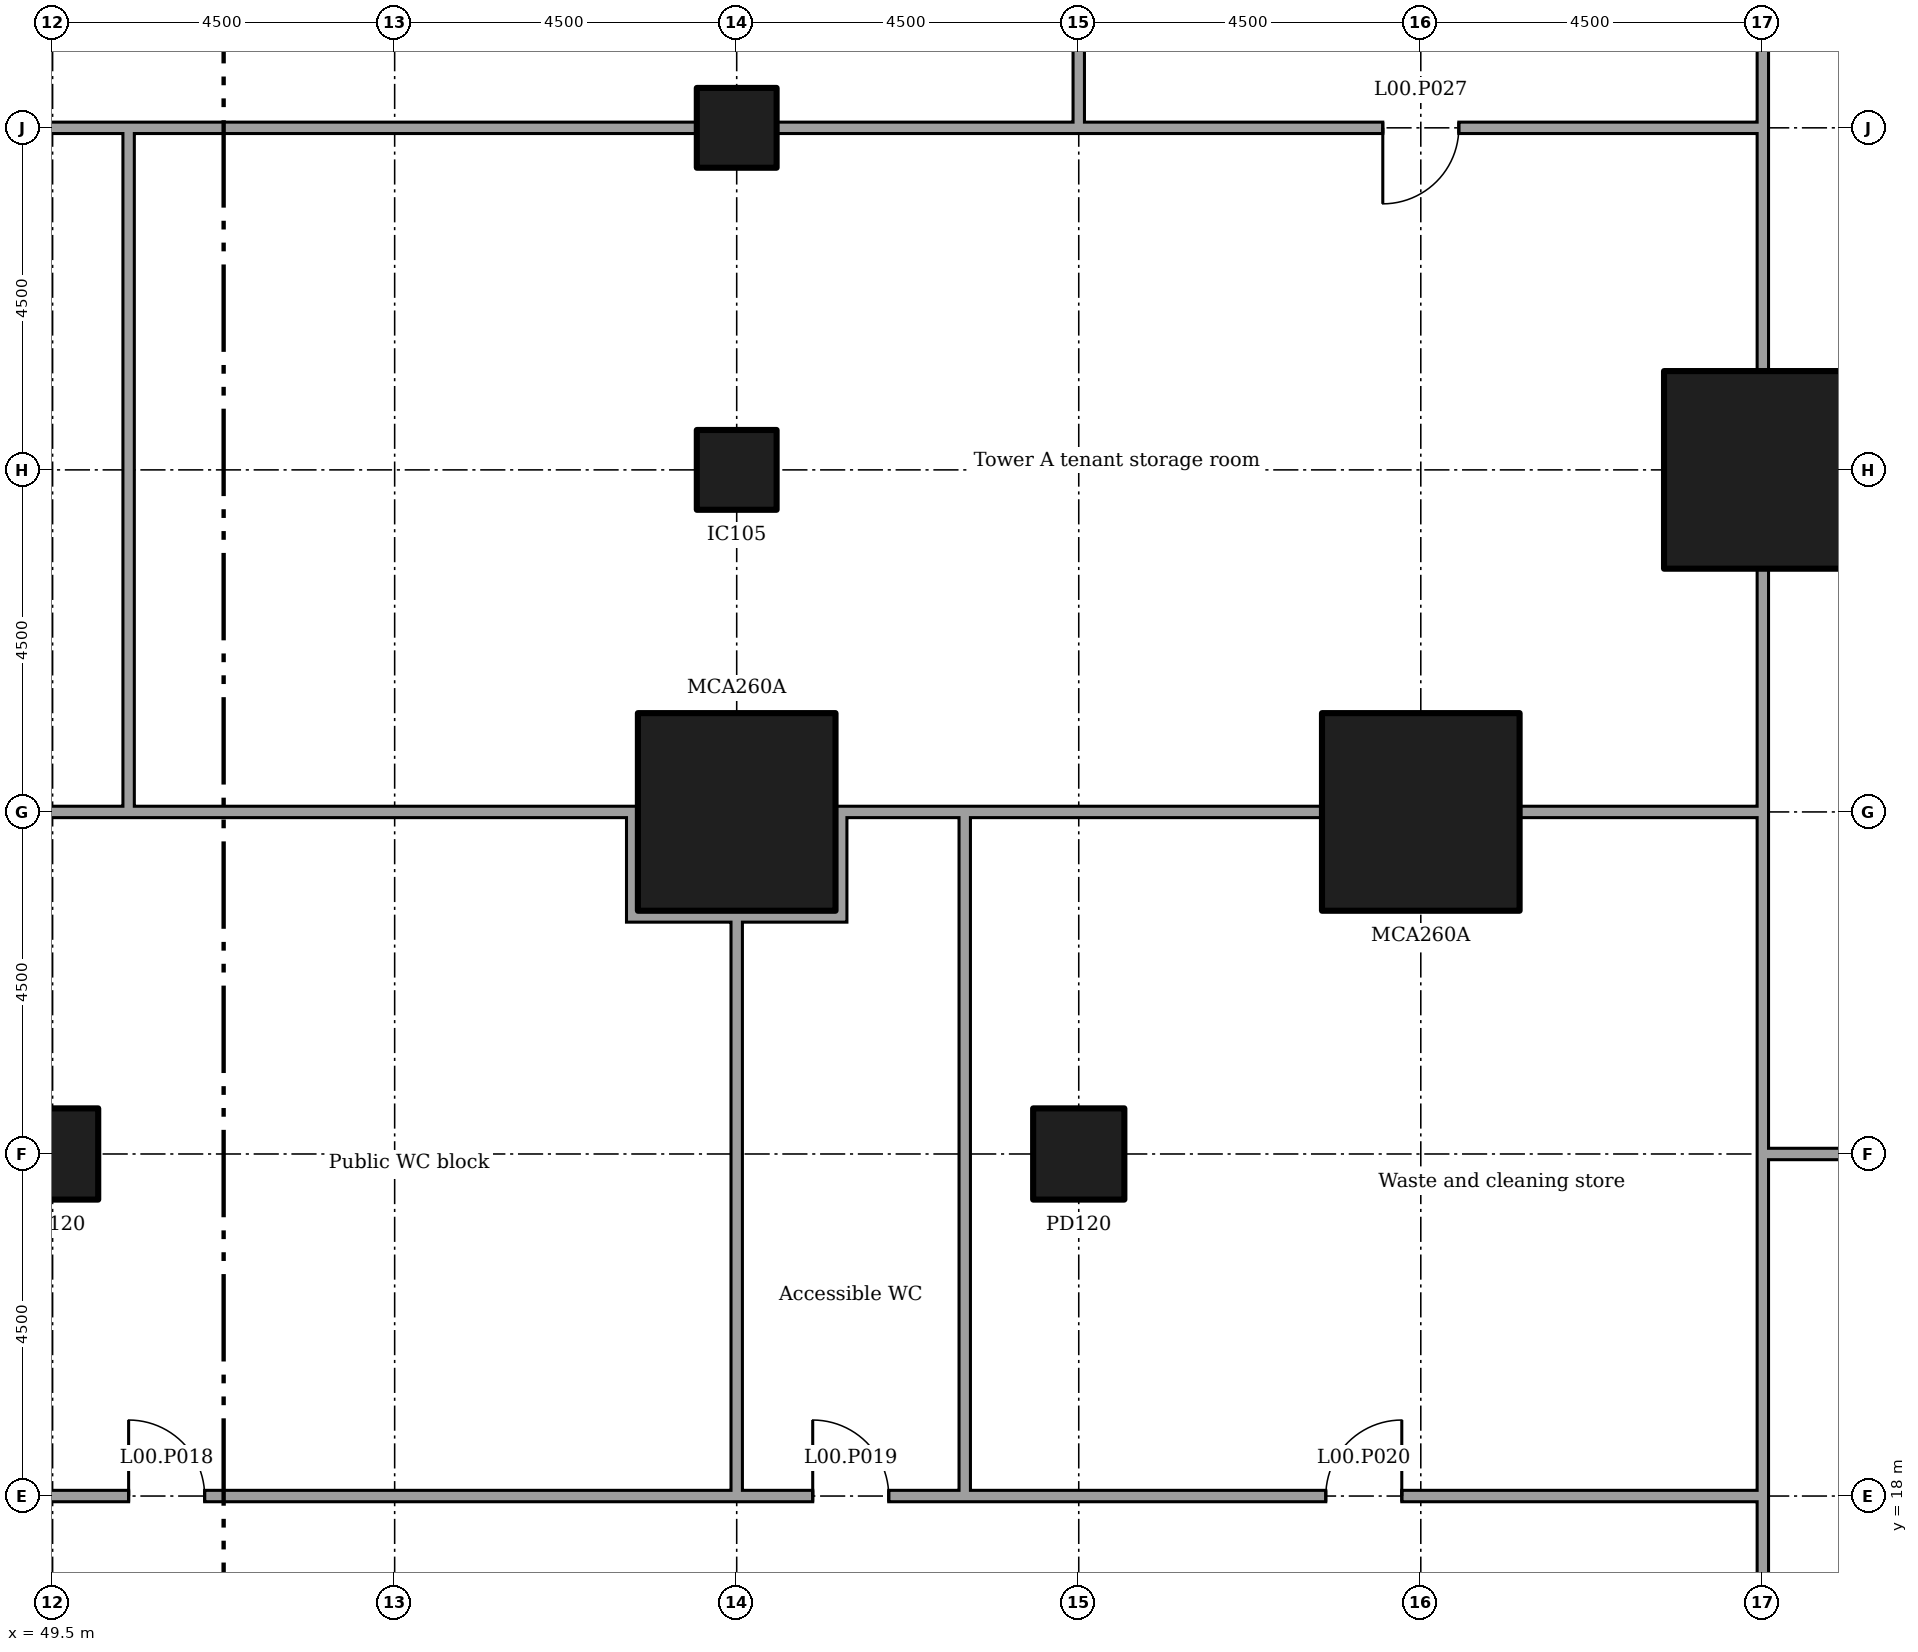
"""IFC4 building model, lengths in metres.
Left out: names, types, materials, properties, quantities, classifications, styles, units other than length and angle.
Written with IfcOpenShell. Run it as: python <this file> out.ifc"""

import sys

from ifc_helpers import new_model, si_unit, direction, frame, frame_2d, origin, origin_2d, place, context, subcontext, project, spatial, rectangle, extrude, element, fill, save


model = new_model("IFC4")
c1 = context("Model", 3, precision=1e-05, world=origin(), true_north=direction((0.0, 1.0)))
c2 = subcontext(c1, "Body", "Model", "MODEL_VIEW")
j1 = project(units=[si_unit("LENGTHUNIT", "METRE"), si_unit("PLANEANGLEUNIT", "RADIAN")], contexts=[c1])
p1 = place(None, origin())
s1 = spatial("IfcSite", under=j1, at=p1, CompositionType="ELEMENT")
p2 = place(p1, origin())
s2 = spatial("IfcBuilding", under=s1, at=p2, CompositionType="ELEMENT")
p3 = place(p2, origin())
s3 = spatial("IfcBuildingStorey", under=s2, at=p3, CompositionType="ELEMENT", Elevation=0.0)
for number, where in (
    (1, (58.5, 27.0, 0.0)),
    (2, (67.5, 27.0, 0.0)),
    (3, (72.0, 31.5, 0.0)),
):
    element("IfcColumn", number, at=place(p3, frame(where)), inside=s3, PredefinedType="COLUMN", context=c2, shape_type="SweptSolid", body=[
        extrude(rectangle(XDim=2.6, YDim=2.6, at=origin_2d()), origin(), (0.0, 0.0, 1.0), 6.0),
    ])
for number, where in (
    (4, (58.5, 31.5, 0.0)),
    (5, (58.5, 36.0, 0.0)),
):
    element("IfcColumn", number, at=place(p3, frame(where)), inside=s3, PredefinedType="COLUMN", context=c2, shape_type="SweptSolid", body=[
        extrude(rectangle(XDim=1.05, YDim=1.05, at=origin_2d()), origin(), (0.0, 0.0, 1.0), 6.0),
    ])
for number, where in (
    (6, (49.5, 22.5, 0.0)),
    (7, (63.0, 22.5, 0.0)),
):
    element("IfcColumn", number, at=place(p3, frame(where)), inside=s3, PredefinedType="COLUMN", context=c2, shape_type="SweptSolid", body=[
        extrude(rectangle(XDim=1.2, YDim=1.2, at=origin_2d()), origin(), (0.0, 0.0, 1.0), 6.0),
    ])
p4 = place(p3, frame((71.925, 22.5, 0.0)))
e8 = element("IfcWall", 8, at=p4, inside=s3, PredefinedType="PARTITIONING", context=c2, shape_type="SweptSolid", body=[
    extrude(rectangle(XDim=3.98, YDim=0.15, at=frame_2d((1.99, 0.0))), origin(), (0.0, 0.0, 1.0), 5.55),
])
p5 = place(p4, frame((1.125, 0.0, 0.0)))
e9 = element("IfcOpeningElement", 9, at=p5, cuts=e8, PredefinedType="OPENING", context=c2, shape_type="SweptSolid", body=[
    extrude(rectangle(XDim=1.8, YDim=2.1, at=frame_2d((0.9, 1.05))), frame((0.0, 0.085, 0.0), z_axis=(0.0, -1.0, 0.0), x_axis=(1.0, 0.0, 0.0)), (0.0, 0.0, 1.0), 0.17),
])
p6 = place(p3, frame((72.0, 9.0, 0.0), z_axis=(0.0, 0.0, 1.0), x_axis=(0.0, 1.0, 0.0)))
e10 = element("IfcWall", 10, at=p6, inside=s3, PredefinedType="PARTITIONING", context=c2, shape_type="SweptSolid", body=[
    extrude(rectangle(XDim=9.075, YDim=0.15, at=frame_2d((4.538, 0.0))), origin(), (0.0, 0.0, 1.0), 5.55),
])
p7 = place(p6, frame((3.6, 0.0, 0.0)))
e11 = element("IfcOpeningElement", 11, at=p7, cuts=e10, PredefinedType="OPENING", context=c2, shape_type="SweptSolid", body=[
    extrude(rectangle(XDim=1.8, YDim=2.1, at=frame_2d((0.9, 1.05))), frame((0.0, 0.085, 0.0), z_axis=(0.0, -1.0, 0.0), x_axis=(1.0, 0.0, 0.0)), (0.0, 0.0, 1.0), 0.17),
])
p8 = place(p3, frame((72.0, 18.0, 0.0), z_axis=(0.0, 0.0, 1.0), x_axis=(0.0, 1.0, 0.0)))
e12 = element("IfcWall", 12, at=p8, inside=s3, PredefinedType="PARTITIONING", context=c2, shape_type="SweptSolid", body=[
    extrude(rectangle(XDim=4.425, YDim=0.15, at=frame_2d((2.212, 0.0))), origin(), (0.0, 0.0, 1.0), 5.55),
])
p9 = place(p3, frame((72.0, 22.5, 0.0), z_axis=(0.0, 0.0, 1.0), x_axis=(0.0, 1.0, 0.0)))
e13 = element("IfcWall", 13, at=p9, inside=s3, PredefinedType="PARTITIONING", context=c2, shape_type="SweptSolid", body=[
    extrude(rectangle(XDim=4.575, YDim=0.15, at=frame_2d((2.288, 0.0))), origin(), (0.0, 0.0, 1.0), 5.55),
])
p10 = place(p3, frame((72.0, 27.0, 0.0), z_axis=(0.0, 0.0, 1.0), x_axis=(0.0, 1.0, 0.0)))
e14 = element("IfcWall", 14, at=p10, inside=s3, PredefinedType="PARTITIONING", context=c2, shape_type="SweptSolid", body=[
    extrude(rectangle(XDim=3.205, YDim=0.15, at=frame_2d((1.603, 0.0))), origin(), (0.0, 0.0, 1.0), 5.55),
])
p11 = place(p3, frame((72.0, 32.795, 0.0), z_axis=(0.0, 0.0, 1.0), x_axis=(0.0, 1.0, 0.0)))
e15 = element("IfcWall", 15, at=p11, inside=s3, PredefinedType="PARTITIONING", context=c2, shape_type="SweptSolid", body=[
    extrude(rectangle(XDim=3.28, YDim=0.15, at=frame_2d((1.64, 0.0))), origin(), (0.0, 0.0, 1.0), 5.55),
])
p12 = place(p3, frame((72.0, 36.0, 0.0), z_axis=(0.0, 0.0, 1.0), x_axis=(0.0, 1.0, 0.0)))
e16 = element("IfcWall", 16, at=p12, inside=s3, PredefinedType="PARTITIONING", context=c2, shape_type="SweptSolid", body=[
    extrude(rectangle(XDim=7.705, YDim=0.15, at=frame_2d((3.853, 0.0))), origin(), (0.0, 0.0, 1.0), 5.55),
])
p13 = place(p12, frame((2.95, 0.0, 0.0)))
e17 = element("IfcOpeningElement", 17, at=p13, cuts=e16, PredefinedType="OPENING", context=c2, shape_type="SweptSolid", body=[
    extrude(rectangle(XDim=1.8, YDim=2.1, at=frame_2d((0.9, 1.05))), frame((0.0, 0.085, 0.0), z_axis=(0.0, -1.0, 0.0), x_axis=(1.0, 0.0, 0.0)), (0.0, 0.0, 1.0), 0.17),
])
p14 = place(p3, frame((43.5, 18.0, 0.0)))
e18 = element("IfcWall", 18, at=p14, inside=s3, PredefinedType="PARTITIONING", context=c2, shape_type="SweptSolid", body=[
    extrude(rectangle(XDim=15.075, YDim=0.15, at=frame_2d((7.538, 0.0))), origin(), (0.0, 0.0, 1.0), 5.55),
])
p15 = place(p14, frame((7.0, 0.0, 0.0)))
e19 = element("IfcOpeningElement", 19, at=p15, cuts=e18, PredefinedType="OPENING", context=c2, shape_type="SweptSolid", body=[
    extrude(rectangle(XDim=1.0, YDim=2.1, at=frame_2d((0.5, 1.05))), frame((0.0, 0.085, 0.0), z_axis=(0.0, -1.0, 0.0), x_axis=(1.0, 0.0, 0.0)), (0.0, 0.0, 1.0), 0.17),
])
p16 = place(p3, frame((58.5, 18.0, 0.0)))
e20 = element("IfcWall", 20, at=p16, inside=s3, PredefinedType="PARTITIONING", context=c2, shape_type="SweptSolid", body=[
    extrude(rectangle(XDim=3.075, YDim=0.15, at=frame_2d((1.538, 0.0))), origin(), (0.0, 0.0, 1.0), 5.55),
])
p17 = place(p16, frame((1.0, 0.0, 0.0)))
e21 = element("IfcOpeningElement", 21, at=p17, cuts=e20, PredefinedType="OPENING", context=c2, shape_type="SweptSolid", body=[
    extrude(rectangle(XDim=1.0, YDim=2.1, at=frame_2d((0.5, 1.05))), frame((0.0, 0.085, 0.0), z_axis=(0.0, -1.0, 0.0), x_axis=(1.0, 0.0, 0.0)), (0.0, 0.0, 1.0), 0.17),
])
p18 = place(p3, frame((61.5, 18.0, 0.0)))
e22 = element("IfcWall", 22, at=p18, inside=s3, PredefinedType="PARTITIONING", context=c2, shape_type="SweptSolid", body=[
    extrude(rectangle(XDim=10.425, YDim=0.15, at=frame_2d((5.212, 0.0))), origin(), (0.0, 0.0, 1.0), 5.55),
])
p19 = place(p18, frame((4.75, 0.0, 0.0)))
e23 = element("IfcOpeningElement", 23, at=p19, cuts=e22, PredefinedType="OPENING", context=c2, shape_type="SweptSolid", body=[
    extrude(rectangle(XDim=1.0, YDim=2.1, at=frame_2d((0.5, 1.05))), frame((0.0, 0.085, 0.0), z_axis=(0.0, -1.0, 0.0), x_axis=(1.0, 0.0, 0.0)), (0.0, 0.0, 1.0), 0.17),
])
p20 = place(p3, frame((58.5, 18.075, 0.0), z_axis=(0.0, 0.0, 1.0), x_axis=(0.0, 1.0, 0.0)))
e24 = element("IfcWall", 24, at=p20, inside=s3, PredefinedType="PARTITIONING", context=c2, shape_type="SweptSolid", body=[
    extrude(rectangle(XDim=7.625, YDim=0.15, at=frame_2d((3.812, 0.0))), origin(), (0.0, 0.0, 1.0), 5.55),
])
p21 = place(p3, frame((46.45, 27.0, 0.0)))
e25 = element("IfcWall", 25, at=p21, inside=s3, PredefinedType="PARTITIONING", context=c2, shape_type="SweptSolid", body=[
    extrude(rectangle(XDim=4.125, YDim=0.15, at=frame_2d((2.062, 0.0))), origin(), (0.0, 0.0, 1.0), 5.55),
])
p22 = place(p3, frame((57.125, 25.55, 0.0), z_axis=(0.0, 0.0, 1.0), x_axis=(0.0, 1.0, 0.0)))
e26 = element("IfcWall", 26, at=p22, inside=s3, PredefinedType="PARTITIONING", context=c2, shape_type="SweptSolid", body=[
    extrude(rectangle(XDim=1.525, YDim=0.15, at=frame_2d((0.762, 0.0))), origin(), (0.0, 0.0, 1.0), 5.55),
])
p23 = place(p3, frame((57.2, 25.625, 0.0)))
e27 = element("IfcWall", 27, at=p23, inside=s3, PredefinedType="PARTITIONING", context=c2, shape_type="SweptSolid", body=[
    extrude(rectangle(XDim=1.225, YDim=0.15, at=frame_2d((0.613, 0.0))), origin(), (0.0, 0.0, 1.0), 5.55),
])
p24 = place(p3, frame((50.5, 27.0, 0.0)))
e28 = element("IfcWall", 28, at=p24, inside=s3, PredefinedType="PARTITIONING", context=c2, shape_type="SweptSolid", body=[
    extrude(rectangle(XDim=6.55, YDim=0.15, at=frame_2d((3.275, 0.0))), origin(), (0.0, 0.0, 1.0), 5.55),
])
p25 = place(p3, frame((61.5, 18.075, 0.0), z_axis=(0.0, 0.0, 1.0), x_axis=(0.0, 1.0, 0.0)))
e29 = element("IfcWall", 29, at=p25, inside=s3, PredefinedType="PARTITIONING", context=c2, shape_type="SweptSolid", body=[
    extrude(rectangle(XDim=9.0, YDim=0.15, at=frame_2d((4.5, 0.0))), origin(), (0.0, 0.0, 1.0), 5.55),
])
p26 = place(p3, frame((59.875, 25.55, 0.0), z_axis=(0.0, 0.0, 1.0), x_axis=(0.0, 1.0, 0.0)))
e30 = element("IfcWall", 30, at=p26, inside=s3, PredefinedType="PARTITIONING", context=c2, shape_type="SweptSolid", body=[
    extrude(rectangle(XDim=1.525, YDim=0.15, at=frame_2d((0.762, 0.0))), origin(), (0.0, 0.0, 1.0), 5.55),
])
p27 = place(p3, frame((58.425, 25.625, 0.0)))
e31 = element("IfcWall", 31, at=p27, inside=s3, PredefinedType="PARTITIONING", context=c2, shape_type="SweptSolid", body=[
    extrude(rectangle(XDim=1.375, YDim=0.15, at=frame_2d((0.688, 0.0))), origin(), (0.0, 0.0, 1.0), 5.55),
])
p28 = place(p3, frame((59.95, 27.0, 0.0)))
e32 = element("IfcWall", 32, at=p28, inside=s3, PredefinedType="PARTITIONING", context=c2, shape_type="SweptSolid", body=[
    extrude(rectangle(XDim=1.55, YDim=0.15, at=frame_2d((0.775, 0.0))), origin(), (0.0, 0.0, 1.0), 5.55),
])
p29 = place(p3, frame((61.575, 27.0, 0.0)))
e33 = element("IfcWall", 33, at=p29, inside=s3, PredefinedType="PARTITIONING", context=c2, shape_type="SweptSolid", body=[
    extrude(rectangle(XDim=4.63, YDim=0.15, at=frame_2d((2.315, 0.0))), origin(), (0.0, 0.0, 1.0), 5.55),
])
p30 = place(p3, frame((68.795, 27.0, 0.0)))
e34 = element("IfcWall", 34, at=p30, inside=s3, PredefinedType="PARTITIONING", context=c2, shape_type="SweptSolid", body=[
    extrude(rectangle(XDim=3.13, YDim=0.15, at=frame_2d((1.565, 0.0))), origin(), (0.0, 0.0, 1.0), 5.55),
])
p31 = place(p3, frame((50.5, 27.075, 0.0), z_axis=(0.0, 0.0, 1.0), x_axis=(0.0, 1.0, 0.0)))
e35 = element("IfcWall", 35, at=p31, inside=s3, PredefinedType="PARTITIONING", context=c2, shape_type="SweptSolid", body=[
    extrude(rectangle(XDim=9.0, YDim=0.15, at=frame_2d((4.5, 0.0))), origin(), (0.0, 0.0, 1.0), 5.55),
])
p32 = place(p3, frame((36.075, 36.0, 0.0)))
e36 = element("IfcWall", 36, at=p32, inside=s3, PredefinedType="PARTITIONING", context=c2, shape_type="SweptSolid", body=[
    extrude(rectangle(XDim=14.425, YDim=0.15, at=frame_2d((7.212, 0.0))), origin(), (0.0, 0.0, 1.0), 5.55),
])
p33 = place(p32, frame((6.675, 0.0, 0.0)))
e37 = element("IfcOpeningElement", 37, at=p33, cuts=e36, PredefinedType="OPENING", context=c2, shape_type="SweptSolid", body=[
    extrude(rectangle(XDim=1.0, YDim=2.1, at=frame_2d((0.5, 1.05))), frame((0.0, 0.085, 0.0), z_axis=(0.0, -1.0, 0.0), x_axis=(1.0, 0.0, 0.0)), (0.0, 0.0, 1.0), 0.17),
])
p34 = place(p3, frame((62.925, 36.0, 0.0)))
e38 = element("IfcWall", 38, at=p34, inside=s3, PredefinedType="PARTITIONING", context=c2, shape_type="SweptSolid", body=[
    extrude(rectangle(XDim=9.0, YDim=0.15, at=frame_2d((4.5, 0.0))), origin(), (0.0, 0.0, 1.0), 5.55),
])
p35 = place(p34, frame((4.075, 0.0, 0.0)))
e39 = element("IfcOpeningElement", 39, at=p35, cuts=e38, PredefinedType="OPENING", context=c2, shape_type="SweptSolid", body=[
    extrude(rectangle(XDim=1.0, YDim=2.1, at=frame_2d((0.5, 1.05))), frame((0.0, 0.085, 0.0), z_axis=(0.0, -1.0, 0.0), x_axis=(1.0, 0.0, 0.0)), (0.0, 0.0, 1.0), 0.17),
])
p36 = place(p3, frame((50.575, 36.0, 0.0)))
e40 = element("IfcWall", 40, at=p36, inside=s3, PredefinedType="PARTITIONING", context=c2, shape_type="SweptSolid", body=[
    extrude(rectangle(XDim=7.405, YDim=0.15, at=frame_2d((3.703, 0.0))), origin(), (0.0, 0.0, 1.0), 5.55),
])
p37 = place(p3, frame((59.02, 36.0, 0.0)))
e41 = element("IfcWall", 41, at=p37, inside=s3, PredefinedType="PARTITIONING", context=c2, shape_type="SweptSolid", body=[
    extrude(rectangle(XDim=3.98, YDim=0.15, at=frame_2d((1.99, 0.0))), origin(), (0.0, 0.0, 1.0), 5.55),
])
p38 = place(p3, frame((63.0, 36.075, 0.0), z_axis=(0.0, 0.0, 1.0), x_axis=(0.0, 1.0, 0.0)))
e42 = element("IfcWall", 42, at=p38, inside=s3, PredefinedType="PARTITIONING", context=c2, shape_type="SweptSolid", body=[
    extrude(rectangle(XDim=21.905, YDim=0.15, at=frame_2d((10.953, 0.0))), origin(), (0.0, 0.0, 1.0), 5.55),
])
p39 = place(p38, frame((10.025, 0.0, 0.0)))
e43 = element("IfcOpeningElement", 43, at=p39, cuts=e42, PredefinedType="OPENING", context=c2, shape_type="SweptSolid", body=[
    extrude(rectangle(XDim=1.8, YDim=2.1, at=frame_2d((0.9, 1.05))), frame((0.0, 0.085, 0.0), z_axis=(0.0, -1.0, 0.0), x_axis=(1.0, 0.0, 0.0)), (0.0, 0.0, 1.0), 0.17),
])
p40 = place(p15, origin())
e44 = element("IfcDoor", 44, at=p40, inside=s3, OperationType="SINGLE_SWING_RIGHT", PredefinedType="DOOR", context=c2, shape_type="SweptSolid", body=[
    extrude(rectangle(XDim=1.0, YDim=2.1, at=frame_2d((0.5, 1.05))), frame((0.0, 0.025, 0.0), z_axis=(0.0, -1.0, 0.0), x_axis=(1.0, 0.0, 0.0)), (0.0, 0.0, 1.0), 0.05),
])
fill(e19, e44)
p41 = place(p17, origin())
e45 = element("IfcDoor", 45, at=p41, inside=s3, OperationType="SINGLE_SWING_RIGHT", PredefinedType="DOOR", context=c2, shape_type="SweptSolid", body=[
    extrude(rectangle(XDim=1.0, YDim=2.1, at=frame_2d((0.5, 1.05))), frame((0.0, 0.025, 0.0), z_axis=(0.0, -1.0, 0.0), x_axis=(1.0, 0.0, 0.0)), (0.0, 0.0, 1.0), 0.05),
])
fill(e21, e45)
p42 = place(p19, origin())
e46 = element("IfcDoor", 46, at=p42, inside=s3, OperationType="SINGLE_SWING_LEFT", PredefinedType="DOOR", context=c2, shape_type="SweptSolid", body=[
    extrude(rectangle(XDim=1.0, YDim=2.1, at=frame_2d((0.5, 1.05))), frame((0.0, 0.025, 0.0), z_axis=(0.0, -1.0, 0.0), x_axis=(1.0, 0.0, 0.0)), (0.0, 0.0, 1.0), 0.05),
])
fill(e23, e46)
p43 = place(p35, frame((1.0, 0.0, 0.0), x_axis=(-1.0, 0.0, 0.0)))
e47 = element("IfcDoor", 47, at=p43, inside=s3, OperationType="SINGLE_SWING_LEFT", PredefinedType="DOOR", context=c2, shape_type="SweptSolid", body=[
    extrude(rectangle(XDim=1.0, YDim=2.1, at=frame_2d((0.5, 1.05))), frame((0.0, 0.025, 0.0), z_axis=(0.0, -1.0, 0.0), x_axis=(1.0, 0.0, 0.0)), (0.0, 0.0, 1.0), 0.05),
])
fill(e39, e47)
save(model, sys.argv[1])
